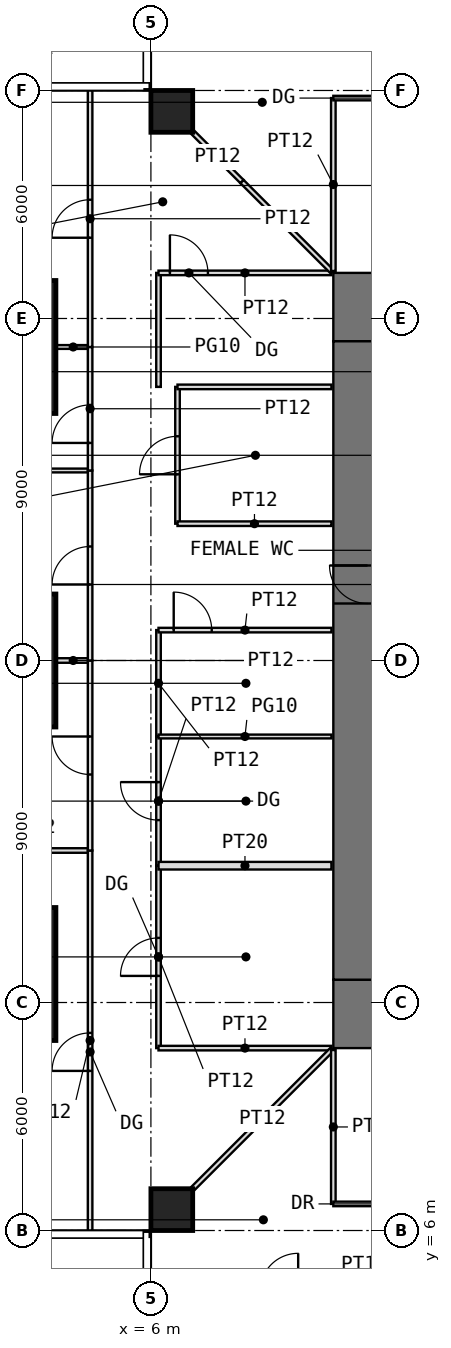
"""IFC4 building model, lengths in metres.
Left out: names, types, materials, properties, quantities, classifications, styles, units other than length and angle.
Written with IfcOpenShell. Run it as: python <this file> out.ifc"""

import sys

from ifc_helpers import new_model, si_unit, direction, frame, frame_2d, origin, origin_2d, place, context, subcontext, project, spatial, rectangle, extrude, element, fill, save


model = new_model("IFC4")
c1 = context("Model", 3, precision=1e-05, world=origin(), true_north=direction((0.0, 1.0)))
c2 = subcontext(c1, "Body", "Model", "MODEL_VIEW")
j1 = project(units=[si_unit("LENGTHUNIT", "METRE"), si_unit("PLANEANGLEUNIT", "RADIAN")], contexts=[c1])
p1 = place(None, origin())
s1 = spatial("IfcSite", under=j1, at=p1, CompositionType="ELEMENT")
p2 = place(p1, origin())
s2 = spatial("IfcBuilding", under=s1, at=p2, CompositionType="ELEMENT")
p3 = place(p2, frame((0.0, 0.0, 82.5)))
s3 = spatial("IfcBuildingStorey", under=s2, at=p3, CompositionType="ELEMENT", Elevation=82.5)
p4 = place(p3, frame((6.55, 6.55, 0.0), z_axis=(0.0, 0.0, 1.0), x_axis=(1.0, 0.0, 0.0)))
e1 = element("IfcColumn", 1, at=p4, inside=s3, PredefinedType="COLUMN", context=c2, shape_type="SweptSolid", body=[
    extrude(rectangle(XDim=1.1, YDim=1.1, at=origin_2d()), origin(), (0.0, 0.0, 1.0), 4.0),
])
for number, where, z_axis, x_axis in (
    (2, (1.75, 12.75, 0.0), (0.0, 0.0, 1.0), (1.0, 0.0, 0.0)),
    (3, (1.75, 21.0, 0.0), (0.0, 0.0, 1.0), (1.0, 0.0, 0.0)),
    (4, (1.75, 29.25, 0.0), (0.0, 0.0, 1.0), (1.0, 0.0, 0.0)),
):
    element("IfcColumn", number, at=place(p3, frame(where, z_axis=z_axis, x_axis=x_axis)), inside=s3, PredefinedType="COLUMN", context=c2, shape_type="SweptSolid", body=[
        extrude(rectangle(XDim=3.5, YDim=3.5, at=origin_2d()), origin(), (0.0, 0.0, 1.0), 4.0),
    ])
p5 = place(p3, frame((6.55, 35.45, 0.0), z_axis=(0.0, 0.0, 1.0), x_axis=(1.0, 0.0, 0.0)))
e5 = element("IfcColumn", 5, at=p5, inside=s3, PredefinedType="COLUMN", context=c2, shape_type="SweptSolid", body=[
    extrude(rectangle(XDim=1.1, YDim=1.1, at=origin_2d()), origin(), (0.0, 0.0, 1.0), 4.0),
])
p6 = place(p3, frame((10.8, 11.7, -0.05), z_axis=(0.0, 0.0, 1.0), x_axis=(1.0, 0.0, 0.0)))
e6 = element("IfcWall", 6, at=p6, inside=s3, PredefinedType="SHEAR", context=c2, shape_type="SweptSolid", body=[
    extrude(rectangle(XDim=20.4, YDim=1.8, at=frame_2d((10.2, 0.0))), origin(), (0.0, 0.0, 1.0), 3.8),
])
p7 = place(p6, frame((9.2, 0.0, 0.05)))
e7 = element("IfcOpeningElement", 7, at=p7, cuts=e6, PredefinedType="OPENING", context=c2, shape_type="SweptSolid", body=[
    extrude(rectangle(XDim=2.0, YDim=2.2, at=frame_2d((1.0, 1.1))), frame((0.0, 0.91, 0.0), z_axis=(0.0, -1.0, 0.0), x_axis=(1.0, 0.0, 0.0)), (0.0, 0.0, 1.0), 1.82),
])
p8 = place(p3, frame((10.8, 30.3, -0.05), z_axis=(0.0, 0.0, 1.0), x_axis=(1.0, 0.0, 0.0)))
e8 = element("IfcWall", 8, at=p8, inside=s3, PredefinedType="SHEAR", context=c2, shape_type="SweptSolid", body=[
    extrude(rectangle(XDim=20.4, YDim=1.8, at=frame_2d((10.2, 0.0))), origin(), (0.0, 0.0, 1.0), 3.8),
])
p9 = place(p8, frame((9.2, 0.0, 0.05)))
e9 = element("IfcOpeningElement", 9, at=p9, cuts=e8, PredefinedType="OPENING", context=c2, shape_type="SweptSolid", body=[
    extrude(rectangle(XDim=2.0, YDim=2.2, at=frame_2d((1.0, 1.1))), frame((0.0, 0.91, 0.0), z_axis=(0.0, -1.0, 0.0), x_axis=(1.0, 0.0, 0.0)), (0.0, 0.0, 1.0), 1.82),
])
p10 = place(p3, frame((11.7, 12.6, -0.05), z_axis=(0.0, 0.0, 1.0), x_axis=(0.0, 1.0, 0.0)))
e10 = element("IfcWall", 10, at=p10, inside=s3, PredefinedType="SHEAR", context=c2, shape_type="SweptSolid", body=[
    extrude(rectangle(XDim=16.8, YDim=1.8, at=frame_2d((8.4, 0.0))), origin(), (0.0, 0.0, 1.0), 3.8),
])
p11 = place(p10, frame((9.9, 0.0, 0.05)))
e11 = element("IfcOpeningElement", 11, at=p11, cuts=e10, PredefinedType="OPENING", context=c2, shape_type="SweptSolid", body=[
    extrude(rectangle(XDim=1.0, YDim=2.2, at=frame_2d((0.5, 1.1))), frame((0.0, 0.91, 0.0), z_axis=(0.0, -1.0, 0.0), x_axis=(1.0, 0.0, 0.0)), (0.0, 0.0, 1.0), 1.82),
])
p12 = place(p3, frame((1.41, 16.0, 0.0), z_axis=(0.0, 0.0, 1.0), x_axis=(1.0, 0.0, 0.0)))
e12 = element("IfcWall", 12, at=p12, inside=s3, PredefinedType="PARTITIONING", context=c2, shape_type="SweptSolid", body=[
    extrude(rectangle(XDim=2.99, YDim=0.12, at=frame_2d((1.495, 0.0))), origin(), (0.0, 0.0, 1.0), 2.736),
])
p13 = place(p3, frame((1.41, 26.0, 0.0), z_axis=(0.0, 0.0, 1.0), x_axis=(1.0, 0.0, 0.0)))
e13 = element("IfcWall", 13, at=p13, inside=s3, PredefinedType="PARTITIONING", context=c2, shape_type="SweptSolid", body=[
    extrude(rectangle(XDim=2.99, YDim=0.1, at=frame_2d((1.495, 0.0))), origin(), (0.0, 0.0, 1.0), 2.736),
])
p14 = place(p3, frame((3.51, 21.0, 0.0), z_axis=(0.0, 0.0, 1.0), x_axis=(1.0, 0.0, 0.0)))
e14 = element("IfcWall", 14, at=p14, inside=s3, PredefinedType="PARTITIONING", context=c2, shape_type="SweptSolid", body=[
    extrude(rectangle(XDim=0.89, YDim=0.12, at=frame_2d((0.445, 0.0))), origin(), (0.0, 0.0, 1.0), 3.55),
])
p15 = place(p3, frame((3.51, 29.25, 0.0), z_axis=(0.0, 0.0, 1.0), x_axis=(1.0, 0.0, 0.0)))
e15 = element("IfcWall", 15, at=p15, inside=s3, PredefinedType="PARTITIONING", context=c2, shape_type="SweptSolid", body=[
    extrude(rectangle(XDim=0.89, YDim=0.1, at=frame_2d((0.445, 0.0))), origin(), (0.0, 0.0, 1.0), 3.55),
])
p16 = place(p3, frame((4.4, 6.0, 0.0), z_axis=(0.0, 0.0, 1.0), x_axis=(0.0, 1.0, 0.0)))
e16 = element("IfcWall", 16, at=p16, inside=s3, PredefinedType="PARTITIONING", context=c2, shape_type="SweptSolid", body=[
    extrude(rectangle(XDim=10.0, YDim=0.12, at=frame_2d((5.0, 0.0))), origin(), (0.0, 0.0, 1.0), 3.55),
])
p17 = place(p16, frame((4.2, 0.0, 0.0)))
e17 = element("IfcOpeningElement", 17, at=p17, cuts=e16, PredefinedType="OPENING", context=c2, shape_type="SweptSolid", body=[
    extrude(rectangle(XDim=1.0, YDim=2.4, at=frame_2d((0.5, 1.2))), frame((0.0, 0.07, 0.0), z_axis=(0.0, -1.0, 0.0), x_axis=(1.0, 0.0, 0.0)), (0.0, 0.0, 1.0), 0.14),
])
p18 = place(p3, frame((4.4, 16.0, 0.0), z_axis=(0.0, 0.0, 1.0), x_axis=(0.0, 1.0, 0.0)))
e18 = element("IfcWall", 18, at=p18, inside=s3, PredefinedType="PARTITIONING", context=c2, shape_type="SweptSolid", body=[
    extrude(rectangle(XDim=5.0, YDim=0.12, at=frame_2d((2.5, 0.0))), origin(), (0.0, 0.0, 1.0), 3.55),
])
p19 = place(p18, frame((2.0, 0.0, 0.0)))
e19 = element("IfcOpeningElement", 19, at=p19, cuts=e18, PredefinedType="OPENING", context=c2, shape_type="SweptSolid", body=[
    extrude(rectangle(XDim=1.0, YDim=2.2, at=frame_2d((0.5, 1.1))), frame((0.0, 0.07, 0.0), z_axis=(0.0, -1.0, 0.0), x_axis=(1.0, 0.0, 0.0)), (0.0, 0.0, 1.0), 0.14),
])
p20 = place(p3, frame((4.4, 21.0, 0.0), z_axis=(0.0, 0.0, 1.0), x_axis=(0.0, 1.0, 0.0)))
e20 = element("IfcWall", 20, at=p20, inside=s3, PredefinedType="PARTITIONING", context=c2, shape_type="SweptSolid", body=[
    extrude(rectangle(XDim=5.0, YDim=0.12, at=frame_2d((2.5, 0.0))), origin(), (0.0, 0.0, 1.0), 3.55),
])
p21 = place(p20, frame((2.0, 0.0, 0.0)))
e21 = element("IfcOpeningElement", 21, at=p21, cuts=e20, PredefinedType="OPENING", context=c2, shape_type="SweptSolid", body=[
    extrude(rectangle(XDim=1.0, YDim=2.4, at=frame_2d((0.5, 1.2))), frame((0.0, 0.07, 0.0), z_axis=(0.0, -1.0, 0.0), x_axis=(1.0, 0.0, 0.0)), (0.0, 0.0, 1.0), 0.14),
])
p22 = place(p3, frame((4.4, 26.0, 0.0), z_axis=(0.0, 0.0, 1.0), x_axis=(0.0, 1.0, 0.0)))
e22 = element("IfcWall", 22, at=p22, inside=s3, PredefinedType="PARTITIONING", context=c2, shape_type="SweptSolid", body=[
    extrude(rectangle(XDim=3.25, YDim=0.12, at=frame_2d((1.625, 0.0))), origin(), (0.0, 0.0, 1.0), 3.55),
])
p23 = place(p22, frame((0.725, 0.0, 0.0)))
e23 = element("IfcOpeningElement", 23, at=p23, cuts=e22, PredefinedType="OPENING", context=c2, shape_type="SweptSolid", body=[
    extrude(rectangle(XDim=1.0, YDim=2.4, at=frame_2d((0.5, 1.2))), frame((0.0, 0.07, 0.0), z_axis=(0.0, -1.0, 0.0), x_axis=(1.0, 0.0, 0.0)), (0.0, 0.0, 1.0), 0.14),
])
p24 = place(p3, frame((4.4, 29.25, 0.0), z_axis=(0.0, 0.0, 1.0), x_axis=(0.0, 1.0, 0.0)))
e24 = element("IfcWall", 24, at=p24, inside=s3, PredefinedType="PARTITIONING", context=c2, shape_type="SweptSolid", body=[
    extrude(rectangle(XDim=6.75, YDim=0.12, at=frame_2d((3.375, 0.0))), origin(), (0.0, 0.0, 1.0), 3.55),
])
p25 = place(p24, frame((2.875, 0.0, 0.0)))
e25 = element("IfcOpeningElement", 25, at=p25, cuts=e24, PredefinedType="OPENING", context=c2, shape_type="SweptSolid", body=[
    extrude(rectangle(XDim=1.0, YDim=2.4, at=frame_2d((0.5, 1.2))), frame((0.0, 0.07, 0.0), z_axis=(0.0, -1.0, 0.0), x_axis=(1.0, 0.0, 0.0)), (0.0, 0.0, 1.0), 0.14),
])
p26 = place(p3, frame((6.2, 10.8, 0.0), z_axis=(0.0, 0.0, 1.0), x_axis=(0.0, 1.0, 0.0)))
e26 = element("IfcWall", 26, at=p26, inside=s3, PredefinedType="PARTITIONING", context=c2, shape_type="SweptSolid", body=[
    extrude(rectangle(XDim=4.8, YDim=0.12, at=frame_2d((2.4, 0.0))), origin(), (0.0, 0.0, 1.0), 3.55),
])
p27 = place(p26, frame((1.9, 0.0, 0.0)))
e27 = element("IfcOpeningElement", 27, at=p27, cuts=e26, PredefinedType="OPENING", context=c2, shape_type="SweptSolid", body=[
    extrude(rectangle(XDim=1.0, YDim=2.4, at=frame_2d((0.5, 1.2))), frame((0.0, 0.07, 0.0), z_axis=(0.0, -1.0, 0.0), x_axis=(1.0, 0.0, 0.0)), (0.0, 0.0, 1.0), 0.14),
])
p28 = place(p3, frame((6.2, 10.8, 0.0), z_axis=(0.0, 0.0, 1.0), x_axis=(1.0, 0.0, 0.0)))
e28 = element("IfcWall", 28, at=p28, inside=s3, PredefinedType="PARTITIONING", context=c2, shape_type="SweptSolid", body=[
    extrude(rectangle(XDim=4.55, YDim=0.12, at=frame_2d((2.275, 0.0))), origin(), (0.0, 0.0, 1.0), 3.55),
])
p29 = place(p3, frame((6.2, 15.6, 0.0), z_axis=(0.0, 0.0, 1.0), x_axis=(0.0, 1.0, 0.0)))
e29 = element("IfcWall", 29, at=p29, inside=s3, PredefinedType="PARTITIONING", context=c2, shape_type="SweptSolid", body=[
    extrude(rectangle(XDim=3.4, YDim=0.12, at=frame_2d((1.7, 0.0))), origin(), (0.0, 0.0, 1.0), 3.55),
])
p30 = place(p29, frame((1.2, 0.0, 0.0)))
e30 = element("IfcOpeningElement", 30, at=p30, cuts=e29, PredefinedType="OPENING", context=c2, shape_type="SweptSolid", body=[
    extrude(rectangle(XDim=1.0, YDim=2.4, at=frame_2d((0.5, 1.2))), frame((0.0, 0.07, 0.0), z_axis=(0.0, -1.0, 0.0), x_axis=(1.0, 0.0, 0.0)), (0.0, 0.0, 1.0), 0.14),
])
p31 = place(p3, frame((6.2, 15.6, 0.0), z_axis=(0.0, 0.0, 1.0), x_axis=(1.0, 0.0, 0.0)))
e31 = element("IfcWall", 31, at=p31, inside=s3, PredefinedType="PARTITIONING", context=c2, shape_type="SweptSolid", body=[
    extrude(rectangle(XDim=4.55, YDim=0.2, at=frame_2d((2.275, 0.0))), origin(), (0.0, 0.0, 1.0), 3.55),
])
p32 = place(p3, frame((6.2, 19.0, 0.0), z_axis=(0.0, 0.0, 1.0), x_axis=(0.0, 1.0, 0.0)))
e32 = element("IfcWall", 32, at=p32, inside=s3, PredefinedType="PARTITIONING", context=c2, shape_type="SweptSolid", body=[
    extrude(rectangle(XDim=2.8, YDim=0.12, at=frame_2d((1.4, 0.0))), origin(), (0.0, 0.0, 1.0), 3.55),
])
p33 = place(p3, frame((6.2, 19.0, 0.0), z_axis=(0.0, 0.0, 1.0), x_axis=(1.0, 0.0, 0.0)))
e33 = element("IfcWall", 33, at=p33, inside=s3, PredefinedType="PARTITIONING", context=c2, shape_type="SweptSolid", body=[
    extrude(rectangle(XDim=4.55, YDim=0.1, at=frame_2d((2.275, 0.0))), origin(), (0.0, 0.0, 1.0), 3.55),
])
p34 = place(p3, frame((6.2, 21.8, 0.0), z_axis=(0.0, 0.0, 1.0), x_axis=(1.0, 0.0, 0.0)))
e34 = element("IfcWall", 34, at=p34, inside=s3, PredefinedType="PARTITIONING", context=c2, shape_type="SweptSolid", body=[
    extrude(rectangle(XDim=4.55, YDim=0.12, at=frame_2d((2.275, 0.0))), origin(), (0.0, 0.0, 1.0), 3.55),
])
p35 = place(p34, frame((0.4, 0.0, 0.0)))
e35 = element("IfcOpeningElement", 35, at=p35, cuts=e34, PredefinedType="OPENING", context=c2, shape_type="SweptSolid", body=[
    extrude(rectangle(XDim=1.0, YDim=2.4, at=frame_2d((0.5, 1.2))), frame((0.0, 0.07, 0.0), z_axis=(0.0, -1.0, 0.0), x_axis=(1.0, 0.0, 0.0)), (0.0, 0.0, 1.0), 0.14),
])
p36 = place(p3, frame((6.2, 28.2, 0.0), z_axis=(0.0, 0.0, 1.0), x_axis=(0.0, 1.0, 0.0)))
e36 = element("IfcWall", 36, at=p36, inside=s3, PredefinedType="PARTITIONING", context=c2, shape_type="SweptSolid", body=[
    extrude(rectangle(XDim=3.0, YDim=0.12, at=frame_2d((1.5, 0.0))), origin(), (0.0, 0.0, 1.0), 3.55),
])
p37 = place(p3, frame((6.2, 31.2, 0.0), z_axis=(0.0, 0.0, 1.0), x_axis=(1.0, 0.0, 0.0)))
e37 = element("IfcWall", 37, at=p37, inside=s3, PredefinedType="PARTITIONING", context=c2, shape_type="SweptSolid", body=[
    extrude(rectangle(XDim=4.55, YDim=0.12, at=frame_2d((2.275, 0.0))), origin(), (0.0, 0.0, 1.0), 3.55),
])
p38 = place(p37, frame((0.3, 0.0, 0.0)))
e38 = element("IfcOpeningElement", 38, at=p38, cuts=e37, PredefinedType="OPENING", context=c2, shape_type="SweptSolid", body=[
    extrude(rectangle(XDim=1.0, YDim=2.4, at=frame_2d((0.5, 1.2))), frame((0.0, 0.07, 0.0), z_axis=(0.0, -1.0, 0.0), x_axis=(1.0, 0.0, 0.0)), (0.0, 0.0, 1.0), 0.14),
])
p39 = place(p3, frame((6.7, 24.6, 0.0), z_axis=(0.0, 0.0, 1.0), x_axis=(0.0, 1.0, 0.0)))
e39 = element("IfcWall", 39, at=p39, inside=s3, PredefinedType="PARTITIONING", context=c2, shape_type="SweptSolid", body=[
    extrude(rectangle(XDim=3.6, YDim=0.12, at=frame_2d((1.8, 0.0))), origin(), (0.0, 0.0, 1.0), 3.55),
])
p40 = place(p39, frame((1.3, 0.0, 0.0)))
e40 = element("IfcOpeningElement", 40, at=p40, cuts=e39, PredefinedType="OPENING", context=c2, shape_type="SweptSolid", body=[
    extrude(rectangle(XDim=1.0, YDim=2.2, at=frame_2d((0.5, 1.1))), frame((0.0, 0.07, 0.0), z_axis=(0.0, -1.0, 0.0), x_axis=(1.0, 0.0, 0.0)), (0.0, 0.0, 1.0), 0.14),
])
for number, where, z_axis, x_axis in (
    (41, (6.7, 24.6, 0.0), (0.0, 0.0, 1.0), (1.0, 0.0, 0.0)),
    (42, (6.7, 28.2, 0.0), (0.0, 0.0, 1.0), (1.0, 0.0, 0.0)),
):
    element("IfcWall", number, at=place(p3, frame(where, z_axis=z_axis, x_axis=x_axis)), inside=s3, PredefinedType="PARTITIONING", context=c2, shape_type="SweptSolid", body=[
        extrude(rectangle(XDim=4.05, YDim=0.12, at=frame_2d((2.025, 0.0))), origin(), (0.0, 0.0, 1.0), 3.55),
    ])
p41 = place(p3, frame((7.11, 7.11, 0.0), z_axis=(0.0, 0.0, 1.0), x_axis=(0.707106781187, 0.707106781187, 0.0)))
e43 = element("IfcWall", 43, at=p41, inside=s3, PredefinedType="PARTITIONING", context=c2, shape_type="SweptSolid", body=[
    extrude(rectangle(XDim=5.168, YDim=0.12, at=frame_2d((2.584, 0.0))), origin(), (0.0, 0.0, 1.0), 3.55),
])
p42 = place(p3, frame((7.11, 34.89, 0.0), z_axis=(0.0, 0.0, 1.0), x_axis=(0.707106781187, -0.707106781187, 0.0)))
e44 = element("IfcWall", 44, at=p42, inside=s3, PredefinedType="PARTITIONING", context=c2, shape_type="SweptSolid", body=[
    extrude(rectangle(XDim=1.822, YDim=0.12, at=frame_2d((0.911, 0.0))), origin(), (0.0, 0.0, 1.0), 3.55),
])
p43 = place(p3, frame((8.398, 33.602, 0.0), z_axis=(0.0, 0.0, 1.0), x_axis=(0.707106781187, -0.707106781187, 0.0)))
e45 = element("IfcWall", 45, at=p43, inside=s3, PredefinedType="PARTITIONING", context=c2, shape_type="SweptSolid", body=[
    extrude(rectangle(XDim=3.346, YDim=0.12, at=frame_2d((1.673, 0.0))), origin(), (0.0, 0.0, 1.0), 3.55),
])
p44 = place(p3, frame((10.8, 6.7, 0.0), z_axis=(0.0, 0.0, 1.0), x_axis=(0.0, 1.0, 0.0)))
e46 = element("IfcWall", 46, at=p44, inside=s3, PredefinedType="PARTITIONING", context=c2, shape_type="SweptSolid", body=[
    extrude(rectangle(XDim=4.05, YDim=0.12, at=frame_2d((2.025, 0.0))), origin(), (0.0, 0.0, 1.0), 3.55),
])
p45 = place(p3, frame((10.8, 6.7, 0.0), z_axis=(0.0, 0.0, 1.0), x_axis=(1.0, 0.0, 0.0)))
e47 = element("IfcWall", 47, at=p45, inside=s3, PredefinedType="PARTITIONING", context=c2, shape_type="SweptSolid", body=[
    extrude(rectangle(XDim=4.2, YDim=0.12, at=frame_2d((2.1, 0.0))), origin(), (0.0, 0.0, 1.0), 3.55),
])
p46 = place(p45, frame((1.6, 0.0, 0.0)))
e48 = element("IfcOpeningElement", 48, at=p46, cuts=e47, PredefinedType="OPENING", context=c2, shape_type="SweptSolid", body=[
    extrude(rectangle(XDim=1.0, YDim=2.2, at=frame_2d((0.5, 1.1))), frame((0.0, 0.07, 0.0), z_axis=(0.0, -1.0, 0.0), x_axis=(1.0, 0.0, 0.0)), (0.0, 0.0, 1.0), 0.14),
])
p47 = place(p3, frame((10.8, 31.25, 0.0), z_axis=(0.0, 0.0, 1.0), x_axis=(0.0, 1.0, 0.0)))
e49 = element("IfcWall", 49, at=p47, inside=s3, PredefinedType="PARTITIONING", context=c2, shape_type="SweptSolid", body=[
    extrude(rectangle(XDim=4.55, YDim=0.12, at=frame_2d((2.275, 0.0))), origin(), (0.0, 0.0, 1.0), 3.55),
])
p48 = place(p3, frame((10.8, 35.8, 0.0), z_axis=(0.0, 0.0, 1.0), x_axis=(1.0, 0.0, 0.0)))
e50 = element("IfcWall", 50, at=p48, inside=s3, PredefinedType="PARTITIONING", context=c2, shape_type="SweptSolid", body=[
    extrude(rectangle(XDim=3.2, YDim=0.12, at=frame_2d((1.6, 0.0))), origin(), (0.0, 0.0, 1.0), 3.55),
])
p49 = place(p48, frame((1.1, 0.0, 0.0)))
e51 = element("IfcOpeningElement", 51, at=p49, cuts=e50, PredefinedType="OPENING", context=c2, shape_type="SweptSolid", body=[
    extrude(rectangle(XDim=1.0, YDim=2.4, at=frame_2d((0.5, 1.2))), frame((0.0, 0.07, 0.0), z_axis=(0.0, -1.0, 0.0), x_axis=(1.0, 0.0, 0.0)), (0.0, 0.0, 1.0), 0.14),
])
p50 = place(p11, origin())
e52 = element("IfcDoor", 52, at=p50, inside=s3, OperationType="SINGLE_SWING_RIGHT", PredefinedType="DOOR", context=c2, shape_type="SweptSolid", body=[
    extrude(rectangle(XDim=1.0, YDim=2.2, at=frame_2d((0.5, 1.1))), frame((0.0, 0.025, 0.0), z_axis=(0.0, -1.0, 0.0), x_axis=(1.0, 0.0, 0.0)), (0.0, 0.0, 1.0), 0.05),
])
fill(e11, e52)
p51 = place(p27, origin())
e53 = element("IfcDoor", 53, at=p51, inside=s3, OperationType="SINGLE_SWING_LEFT", PredefinedType="DOOR", context=c2, shape_type="SweptSolid", body=[
    extrude(rectangle(XDim=1.0, YDim=2.4, at=frame_2d((0.5, 1.2))), frame((0.0, 0.025, 0.0), z_axis=(0.0, -1.0, 0.0), x_axis=(1.0, 0.0, 0.0)), (0.0, 0.0, 1.0), 0.05),
])
fill(e27, e53)
p52 = place(p30, origin())
e54 = element("IfcDoor", 54, at=p52, inside=s3, OperationType="SINGLE_SWING_RIGHT", PredefinedType="DOOR", context=c2, shape_type="SweptSolid", body=[
    extrude(rectangle(XDim=1.0, YDim=2.4, at=frame_2d((0.5, 1.2))), frame((0.0, 0.025, 0.0), z_axis=(0.0, -1.0, 0.0), x_axis=(1.0, 0.0, 0.0)), (0.0, 0.0, 1.0), 0.05),
])
fill(e30, e54)
p53 = place(p40, origin())
e55 = element("IfcDoor", 55, at=p53, inside=s3, OperationType="SINGLE_SWING_LEFT", PredefinedType="DOOR", context=c2, shape_type="SweptSolid", body=[
    extrude(rectangle(XDim=1.0, YDim=2.2, at=frame_2d((0.5, 1.1))), frame((0.0, 0.025, 0.0), z_axis=(0.0, -1.0, 0.0), x_axis=(1.0, 0.0, 0.0)), (0.0, 0.0, 1.0), 0.05),
])
fill(e40, e55)
p54 = place(p19, origin())
e56 = element("IfcDoor", 56, at=p54, inside=s3, OperationType="SINGLE_SWING_RIGHT", PredefinedType="DOOR", context=c2, shape_type="SweptSolid", body=[
    extrude(rectangle(XDim=1.0, YDim=2.2, at=frame_2d((0.5, 1.1))), frame((0.0, 0.025, 0.0), z_axis=(0.0, -1.0, 0.0), x_axis=(1.0, 0.0, 0.0)), (0.0, 0.0, 1.0), 0.05),
])
fill(e19, e56)
p55 = place(p23, origin())
e57 = element("IfcDoor", 57, at=p55, inside=s3, OperationType="SINGLE_SWING_LEFT", PredefinedType="DOOR", context=c2, shape_type="SweptSolid", body=[
    extrude(rectangle(XDim=1.0, YDim=2.4, at=frame_2d((0.5, 1.2))), frame((0.0, 0.025, 0.0), z_axis=(0.0, -1.0, 0.0), x_axis=(1.0, 0.0, 0.0)), (0.0, 0.0, 1.0), 0.05),
])
fill(e23, e57)
p56 = place(p17, origin())
e58 = element("IfcDoor", 58, at=p56, inside=s3, OperationType="SINGLE_SWING_LEFT", PredefinedType="DOOR", context=c2, shape_type="SweptSolid", body=[
    extrude(rectangle(XDim=1.0, YDim=2.4, at=frame_2d((0.5, 1.2))), frame((0.0, 0.025, 0.0), z_axis=(0.0, -1.0, 0.0), x_axis=(1.0, 0.0, 0.0)), (0.0, 0.0, 1.0), 0.05),
])
fill(e17, e58)
p57 = place(p21, origin())
e59 = element("IfcDoor", 59, at=p57, inside=s3, OperationType="SINGLE_SWING_LEFT", PredefinedType="DOOR", context=c2, shape_type="SweptSolid", body=[
    extrude(rectangle(XDim=1.0, YDim=2.4, at=frame_2d((0.5, 1.2))), frame((0.0, 0.025, 0.0), z_axis=(0.0, -1.0, 0.0), x_axis=(1.0, 0.0, 0.0)), (0.0, 0.0, 1.0), 0.05),
])
fill(e21, e59)
p58 = place(p25, origin())
e60 = element("IfcDoor", 60, at=p58, inside=s3, OperationType="SINGLE_SWING_LEFT", PredefinedType="DOOR", context=c2, shape_type="SweptSolid", body=[
    extrude(rectangle(XDim=1.0, YDim=2.4, at=frame_2d((0.5, 1.2))), frame((0.0, 0.025, 0.0), z_axis=(0.0, -1.0, 0.0), x_axis=(1.0, 0.0, 0.0)), (0.0, 0.0, 1.0), 0.05),
])
fill(e25, e60)
p59 = place(p38, origin())
e61 = element("IfcDoor", 61, at=p59, inside=s3, OperationType="SINGLE_SWING_LEFT", PredefinedType="DOOR", context=c2, shape_type="SweptSolid", body=[
    extrude(rectangle(XDim=1.0, YDim=2.4, at=frame_2d((0.5, 1.2))), frame((0.0, 0.025, 0.0), z_axis=(0.0, -1.0, 0.0), x_axis=(1.0, 0.0, 0.0)), (0.0, 0.0, 1.0), 0.05),
])
fill(e38, e61)
p60 = place(p35, origin())
e62 = element("IfcDoor", 62, at=p60, inside=s3, OperationType="SINGLE_SWING_LEFT", PredefinedType="DOOR", context=c2, shape_type="SweptSolid", body=[
    extrude(rectangle(XDim=1.0, YDim=2.4, at=frame_2d((0.5, 1.2))), frame((0.0, 0.025, 0.0), z_axis=(0.0, -1.0, 0.0), x_axis=(1.0, 0.0, 0.0)), (0.0, 0.0, 1.0), 0.05),
])
fill(e35, e62)
save(model, sys.argv[1])
